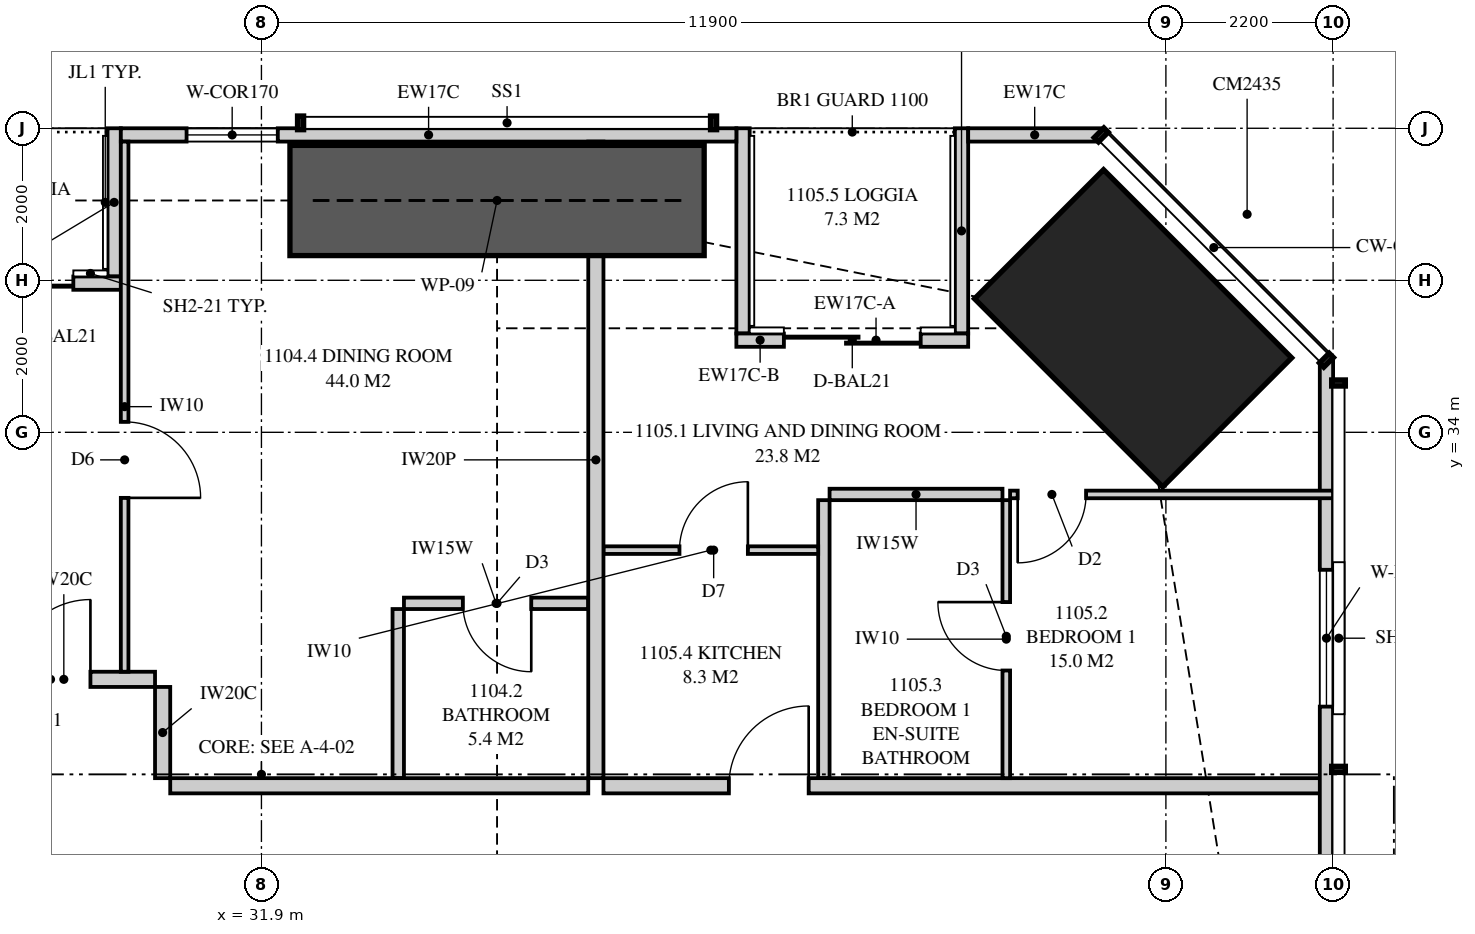
"""IFC4 building model, lengths in metres.
Left out: names, types, materials, properties, quantities, classifications, styles, units other than length and angle.
Written with IfcOpenShell. Run it as: python <this file> out.ifc"""

import sys

from ifc_helpers import new_model, si_unit, direction, frame, frame_2d, origin, origin_2d, place, context, subcontext, project, spatial, polyline, rectangle, outline, extrude, element, fill, save


model = new_model("IFC4")
c1 = context("Model", 3, precision=1e-05, world=origin(), true_north=direction((0.0, 1.0)))
c2 = subcontext(c1, "Body", "Model", "MODEL_VIEW")
j1 = project(units=[si_unit("LENGTHUNIT", "METRE"), si_unit("PLANEANGLEUNIT", "RADIAN")], contexts=[c1])
p1 = place(None, origin())
s1 = spatial("IfcSite", under=j1, at=p1, CompositionType="ELEMENT")
p2 = place(p1, origin())
s2 = spatial("IfcBuilding", under=s1, at=p2, CompositionType="ELEMENT")
p3 = place(p2, frame((0.0, 0.0, 44.45)))
s3 = spatial("IfcBuildingStorey", under=s2, at=p3, CompositionType="ELEMENT", Elevation=44.45)
p4 = place(p3, frame((43.369, 35.369, 0.0), z_axis=(0.0, 0.0, 1.0), x_axis=(-0.707106781187, -0.707106781187, 0.0)))
e1 = element("IfcColumn", 1, at=p4, inside=s3, PredefinedType="COLUMN", context=c2, shape_type="SweptSolid", body=[
    extrude(rectangle(XDim=2.4, YDim=3.5, at=origin_2d()), origin(), (0.0, 0.0, 1.0), 3.35),
])
p5 = place(p3, frame((45.913, 3.051, 0.0), z_axis=(0.0, 0.0, 1.0), x_axis=(0.0, 1.0, 0.0)))
e2 = element("IfcWall", 2, at=p5, inside=s3, PredefinedType="SOLIDWALL", context=c2, shape_type="SweptSolid", body=[
    extrude(outline(polyline([(0.0, 0.0), (31.897, 0.0), (31.897, 3.11), (22.167, 3.11), (22.167, 2.15), (22.074, 2.15), (22.074, 3.11), (21.949, 3.11), (21.949, 2.15), (9.949, 2.15), (9.949, 3.11), (9.823, 3.11), (9.823, 2.15), (9.73, 2.15), (9.73, 3.11), (0.0, 3.11), (0.0, 0.0)])), frame((0.0, 0.087, 0.0), z_axis=(0.0, -1.0, 0.0), x_axis=(1.0, 0.0, 0.0)), (0.0, 0.0, 1.0), 0.175),
])
p6 = place(p5, frame((2.257, 0.0, 0.4)))
e3 = element("IfcOpeningElement", 3, at=p6, cuts=e2, PredefinedType="OPENING", context=c2, shape_type="SweptSolid", body=[
    extrude(rectangle(XDim=1.8, YDim=1.7, at=frame_2d((0.9, 0.85))), frame((0.0, 0.097, 0.0), z_axis=(0.0, -1.0, 0.0), x_axis=(1.0, 0.0, 0.0)), (0.0, 0.0, 1.0), 0.195),
])
p7 = place(p5, frame((14.849, 0.0, 0.4)))
e4 = element("IfcOpeningElement", 4, at=p7, cuts=e2, PredefinedType="OPENING", context=c2, shape_type="SweptSolid", body=[
    extrude(rectangle(XDim=1.2, YDim=1.7, at=frame_2d((0.6, 0.85))), frame((0.0, 0.097, 0.0), z_axis=(0.0, -1.0, 0.0), x_axis=(1.0, 0.0, 0.0)), (0.0, 0.0, 1.0), 0.195),
])
p8 = place(p5, frame((27.34, 0.0, 0.4)))
e5 = element("IfcOpeningElement", 5, at=p8, cuts=e2, PredefinedType="OPENING", context=c2, shape_type="SweptSolid", body=[
    extrude(rectangle(XDim=1.8, YDim=1.7, at=frame_2d((0.9, 0.85))), frame((0.0, 0.097, 0.0), z_axis=(0.0, -1.0, 0.0), x_axis=(1.0, 0.0, 0.0)), (0.0, 0.0, 1.0), 0.195),
])
p9 = place(p3, frame((42.949, 37.913, 0.0), z_axis=(0.0, 0.0, 1.0), x_axis=(-1.0, 0.0, 0.0)))
e6 = element("IfcWall", 6, at=p9, inside=s3, PredefinedType="SOLIDWALL", context=c2, shape_type="SweptSolid", body=[
    extrude(rectangle(XDim=1.75, YDim=0.175, at=frame_2d((0.875, 0.0))), origin(), (0.0, 0.0, 1.0), 3.11),
])
p10 = place(p3, frame((38.149, 37.913, 0.0), z_axis=(0.0, 0.0, 1.0), x_axis=(-1.0, 0.0, 0.0)))
e7 = element("IfcWall", 7, at=p10, inside=s3, PredefinedType="SOLIDWALL", context=c2, shape_type="SweptSolid", body=[
    extrude(outline(polyline([(0.0, 0.0), (8.099, 0.0), (8.099, 2.15), (3.149, 2.15), (3.149, 3.11), (2.993, 3.11), (2.993, 2.15), (2.945, 2.15), (2.945, 3.11), (0.0, 3.11), (0.0, 0.0)])), frame((0.0, 0.087, 0.0), z_axis=(0.0, -1.0, 0.0), x_axis=(1.0, 0.0, 0.0)), (0.0, 0.0, 1.0), 0.175),
])
p11 = place(p10, frame((6.034, 0.0, 0.4)))
e8 = element("IfcOpeningElement", 8, at=p11, cuts=e7, PredefinedType="OPENING", context=c2, shape_type="SweptSolid", body=[
    extrude(rectangle(XDim=1.2, YDim=1.7, at=frame_2d((0.6, 0.85))), frame((0.0, 0.097, 0.0), z_axis=(0.0, -1.0, 0.0), x_axis=(1.0, 0.0, 0.0)), (0.0, 0.0, 1.0), 0.195),
])
p12 = place(p3, frame((41.199, 35.212, 0.0), z_axis=(0.0, 0.0, 1.0), x_axis=(-1.0, 0.0, 0.0)))
e9 = element("IfcWall", 9, at=p12, inside=s3, PredefinedType="SOLIDWALL", context=c2, shape_type="SweptSolid", body=[
    extrude(rectangle(XDim=2.425, YDim=0.175, at=frame_2d((1.212, 0.0))), origin(), (0.0, 0.0, 1.0), 2.15),
])
p13 = place(p12, frame((0.625, 0.0, 0.0)))
e10 = element("IfcOpeningElement", 10, at=p13, cuts=e9, PredefinedType="OPENING", context=c2, shape_type="SweptSolid", body=[
    extrude(rectangle(XDim=1.8, YDim=2.1, at=frame_2d((0.9, 1.05))), frame((0.0, 0.097, 0.0), z_axis=(0.0, -1.0, 0.0), x_axis=(1.0, 0.0, 0.0)), (0.0, 0.0, 1.0), 0.195),
])
p14 = place(p3, frame((38.774, 35.212, 0.0), z_axis=(0.0, 0.0, 1.0), x_axis=(-1.0, 0.0, 0.0)))
e11 = element("IfcWall", 11, at=p14, inside=s3, PredefinedType="SOLIDWALL", context=c2, shape_type="SweptSolid", body=[
    extrude(rectangle(XDim=0.625, YDim=0.175, at=frame_2d((0.312, 0.0))), origin(), (0.0, 0.0, 1.0), 2.51),
])
p15 = place(p3, frame((41.111, 38.0, 0.0), z_axis=(0.0, 0.0, 1.0), x_axis=(0.0, -1.0, 0.0)))
e12 = element("IfcWall", 12, at=p15, inside=s3, PredefinedType="SOLIDWALL", context=c2, shape_type="SweptSolid", body=[
    extrude(outline(polyline([(0.0, 0.0), (2.7, 0.0), (2.7, 2.15), (1.344, 2.15), (1.344, 3.11), (0.0, 3.11), (0.0, 0.0)])), frame((0.0, 0.087, 0.0), z_axis=(0.0, -1.0, 0.0), x_axis=(1.0, 0.0, 0.0)), (0.0, 0.0, 1.0), 0.175),
])
p16 = place(p3, frame((38.236, 38.0, 0.0), z_axis=(0.0, 0.0, 1.0), x_axis=(0.0, -1.0, 0.0)))
e13 = element("IfcWall", 13, at=p16, inside=s3, PredefinedType="SOLIDWALL", context=c2, shape_type="SweptSolid", body=[
    extrude(outline(polyline([(0.0, 0.0), (2.7, 0.0), (2.7, 2.51), (2.434, 2.51), (2.434, 2.15), (0.767, 2.15), (0.767, 3.11), (0.0, 3.11), (0.0, 0.0)])), frame((0.0, 0.087, 0.0), z_axis=(0.0, -1.0, 0.0), x_axis=(1.0, 0.0, 0.0)), (0.0, 0.0, 1.0), 0.175),
])
p17 = place(p3, frame((30.05, 35.962, 0.0), z_axis=(0.0, 0.0, 1.0), x_axis=(-1.0, 0.0, 0.0)))
e14 = element("IfcWall", 14, at=p17, inside=s3, PredefinedType="SOLIDWALL", context=c2, shape_type="SweptSolid", body=[
    extrude(rectangle(XDim=3.05, YDim=0.175, at=frame_2d((1.525, 0.0))), origin(), (0.0, 0.0, 1.0), 3.11),
])
p18 = place(p17, frame((0.625, 0.0, 0.0)))
e15 = element("IfcOpeningElement", 15, at=p18, cuts=e14, PredefinedType="OPENING", context=c2, shape_type="SweptSolid", body=[
    extrude(rectangle(XDim=1.8, YDim=2.1, at=frame_2d((0.9, 1.05))), frame((0.0, 0.097, 0.0), z_axis=(0.0, -1.0, 0.0), x_axis=(1.0, 0.0, 0.0)), (0.0, 0.0, 1.0), 0.195),
])
p19 = place(p3, frame((29.962, 38.0, 0.0), z_axis=(0.0, 0.0, 1.0), x_axis=(0.0, -1.0, 0.0)))
e16 = element("IfcWall", 16, at=p19, inside=s3, PredefinedType="SOLIDWALL", context=c2, shape_type="SweptSolid", body=[
    extrude(outline(polyline([(0.0, 0.0), (1.95, 0.0), (1.95, 3.11), (1.75, 3.11), (1.75, 2.15), (0.15, 2.15), (0.15, 3.11), (0.0, 3.11), (0.0, 0.0)])), frame((0.0, 0.087, 0.0), z_axis=(0.0, -1.0, 0.0), x_axis=(1.0, 0.0, 0.0)), (0.0, 0.0, 1.0), 0.175),
])
p20 = place(p3, frame((36.3, 37.825, 0.0), z_axis=(0.0, 0.0, 1.0), x_axis=(0.0, -1.0, 0.0)))
e17 = element("IfcWall", 17, at=p20, inside=s3, PredefinedType="PARTITIONING", context=c2, shape_type="SweptSolid", body=[
    extrude(outline(polyline([(0.108, 3.11), (0.0, 3.11), (0.0, 0.0), (0.529, 0.0), (0.529, 0.608), (1.021, 0.608), (1.021, 0.0), (8.375, 0.0), (8.375, 3.11), (3.766, 3.11), (3.766, 2.51), (1.964, 2.51), (1.964, 2.15), (1.021, 2.15), (1.021, 1.542), (0.529, 1.542), (0.529, 2.15), (0.108, 2.15), (0.108, 3.11)])), frame((0.0, 0.1, 0.0), z_axis=(0.0, -1.0, 0.0), x_axis=(1.0, 0.0, 0.0)), (0.0, 0.0, 1.0), 0.2),
])
p21 = place(p3, frame((33.775, 31.75, 0.0), z_axis=(0.0, 0.0, 1.0), x_axis=(1.0, 0.0, 0.0)))
e18 = element("IfcWall", 18, at=p21, inside=s3, PredefinedType="PLUMBINGWALL", context=c2, shape_type="SweptSolid", body=[
    extrude(outline(polyline([(0.0, 0.0), (2.425, 0.0), (2.425, 3.11), (1.537, 3.11), (1.537, 2.541), (0.913, 2.541), (0.913, 3.11), (0.0, 3.11), (0.0, 0.0)])), frame((0.0, 0.075, 0.0), z_axis=(0.0, -1.0, 0.0), x_axis=(1.0, 0.0, 0.0)), (0.0, 0.0, 1.0), 0.15),
])
p22 = place(p21, frame((0.775, 0.0, 0.0)))
e19 = element("IfcOpeningElement", 19, at=p22, cuts=e18, PredefinedType="OPENING", context=c2, shape_type="SweptSolid", body=[
    extrude(rectangle(XDim=0.9, YDim=2.1, at=frame_2d((0.45, 1.05))), frame((0.0, 0.085, 0.0), z_axis=(0.0, -1.0, 0.0), x_axis=(1.0, 0.0, 0.0)), (0.0, 0.0, 1.0), 0.17),
])
p23 = place(p3, frame((33.7, 31.675, 0.0), z_axis=(0.0, 0.0, 1.0), x_axis=(0.0, -1.0, 0.0)))
e20 = element("IfcWall", 20, at=p23, inside=s3, PredefinedType="PLUMBINGWALL", context=c2, shape_type="SweptSolid", body=[
    extrude(rectangle(XDim=2.225, YDim=0.15, at=frame_2d((1.113, 0.0))), origin(), (0.0, 0.0, 1.0), 3.11),
])
p24 = place(p3, frame((30.1, 37.825, 0.0), z_axis=(0.0, 0.0, 1.0), x_axis=(0.0, -1.0, 0.0)))
e21 = element("IfcWall", 21, at=p24, inside=s3, PredefinedType="PARTITIONING", context=c2, shape_type="SweptSolid", body=[
    extrude(outline(polyline([(0.0, 0.0), (6.975, 0.0), (6.975, 3.11), (1.635, 3.11), (1.635, 2.15), (0.0, 2.15), (0.0, 3.11), (0.0, 0.0)])), frame((0.0, 0.05, 0.0), z_axis=(0.0, -1.0, 0.0), x_axis=(1.0, 0.0, 0.0)), (0.0, 0.0, 1.0), 0.1),
])
p25 = place(p24, frame((3.688, 0.0, 0.0)))
e22 = element("IfcOpeningElement", 22, at=p25, cuts=e21, PredefinedType="OPENING", context=c2, shape_type="SweptSolid", body=[
    extrude(rectangle(XDim=1.0, YDim=2.1, at=frame_2d((0.5, 1.05))), frame((0.0, 0.06, 0.0), z_axis=(0.0, -1.0, 0.0), x_axis=(1.0, 0.0, 0.0)), (0.0, 0.0, 1.0), 0.12),
])
p26 = place(p3, frame((36.4, 29.35, 0.0), z_axis=(0.0, 0.0, 1.0), x_axis=(1.0, 0.0, 0.0)))
e23 = element("IfcWall", 23, at=p26, inside=s3, PredefinedType="PARTITIONING", context=c2, shape_type="SweptSolid", body=[
    extrude(outline(polyline([(0.0, 0.0), (9.6, 0.0), (9.6, 3.11), (8.866, 3.11), (8.866, 2.15), (7.023, 2.15), (7.023, 3.11), (0.0, 3.11), (0.0, 0.0)])), frame((0.0, 0.1, 0.0), z_axis=(0.0, -1.0, 0.0), x_axis=(1.0, 0.0, 0.0)), (0.0, 0.0, 1.0), 0.2),
])
p27 = place(p26, frame((1.65, 0.0, 0.0)))
e24 = element("IfcOpeningElement", 24, at=p27, cuts=e23, PredefinedType="OPENING", context=c2, shape_type="SweptSolid", body=[
    extrude(rectangle(XDim=1.05, YDim=2.2, at=frame_2d((0.525, 1.1))), frame((0.0, 0.11, 0.0), z_axis=(0.0, -1.0, 0.0), x_axis=(1.0, 0.0, 0.0)), (0.0, 0.0, 1.0), 0.22),
])
p28 = place(p3, frame((41.7, 33.108, 0.0), z_axis=(0.0, 0.0, 1.0), x_axis=(0.0, -1.0, 0.0)))
e25 = element("IfcWall", 25, at=p28, inside=s3, PredefinedType="PARTITIONING", context=c2, shape_type="SweptSolid", body=[
    extrude(rectangle(XDim=3.658, YDim=0.1, at=frame_2d((1.829, 0.0))), origin(), (0.0, 0.0, 1.0), 3.11),
])
p29 = place(p28, frame((1.341, 0.0, 0.0)))
e26 = element("IfcOpeningElement", 26, at=p29, cuts=e25, PredefinedType="OPENING", context=c2, shape_type="SweptSolid", body=[
    extrude(rectangle(XDim=0.9, YDim=2.1, at=frame_2d((0.45, 1.05))), frame((0.0, 0.06, 0.0), z_axis=(0.0, -1.0, 0.0), x_axis=(1.0, 0.0, 0.0)), (0.0, 0.0, 1.0), 0.12),
])
p30 = place(p3, frame((41.75, 33.183, 0.0), z_axis=(0.0, 0.0, 1.0), x_axis=(1.0, 0.0, 0.0)))
e27 = element("IfcWall", 27, at=p30, inside=s3, PredefinedType="PARTITIONING", context=c2, shape_type="SweptSolid", body=[
    extrude(outline(polyline([(0.0, 0.0), (4.25, 0.0), (4.25, 3.11), (2.844, 3.11), (2.844, 2.15), (1.102, 2.15), (1.102, 3.11), (0.0, 3.11), (0.0, 0.0)])), frame((0.0, 0.05, 0.0), z_axis=(0.0, -1.0, 0.0), x_axis=(1.0, 0.0, 0.0)), (0.0, 0.0, 1.0), 0.1),
])
p31 = place(p30, frame((0.1, 0.0, 0.0)))
e28 = element("IfcOpeningElement", 28, at=p31, cuts=e27, PredefinedType="OPENING", context=c2, shape_type="SweptSolid", body=[
    extrude(rectangle(XDim=0.9, YDim=2.1, at=frame_2d((0.45, 1.05))), frame((0.0, 0.06, 0.0), z_axis=(0.0, -1.0, 0.0), x_axis=(1.0, 0.0, 0.0)), (0.0, 0.0, 1.0), 0.12),
])
p32 = place(p3, frame((39.375, 33.183, 0.0), z_axis=(0.0, 0.0, 1.0), x_axis=(1.0, 0.0, 0.0)))
e29 = element("IfcWall", 29, at=p32, inside=s3, PredefinedType="PLUMBINGWALL", context=c2, shape_type="SweptSolid", body=[
    extrude(rectangle(XDim=2.275, YDim=0.15, at=frame_2d((1.137, 0.0))), origin(), (0.0, 0.0, 1.0), 3.11),
])
p33 = place(p3, frame((39.3, 33.108, 0.0), z_axis=(0.0, 0.0, 1.0), x_axis=(0.0, -1.0, 0.0)))
e30 = element("IfcWall", 30, at=p33, inside=s3, PredefinedType="PLUMBINGWALL", context=c2, shape_type="SweptSolid", body=[
    extrude(rectangle(XDim=3.658, YDim=0.15, at=frame_2d((1.829, 0.0))), origin(), (0.0, 0.0, 1.0), 3.11),
])
p34 = place(p3, frame((36.4, 32.45, 0.0), z_axis=(0.0, 0.0, 1.0), x_axis=(1.0, 0.0, 0.0)))
e31 = element("IfcWall", 31, at=p34, inside=s3, PredefinedType="PARTITIONING", context=c2, shape_type="SweptSolid", body=[
    extrude(rectangle(XDim=2.825, YDim=0.1, at=frame_2d((1.413, 0.0))), origin(), (0.0, 0.0, 1.0), 3.11),
])
p35 = place(p34, frame((1.0, 0.0, 0.0)))
e32 = element("IfcOpeningElement", 32, at=p35, cuts=e31, PredefinedType="OPENING", context=c2, shape_type="SweptSolid", body=[
    extrude(rectangle(XDim=0.9, YDim=2.1, at=frame_2d((0.45, 1.05))), frame((0.0, 0.06, 0.0), z_axis=(0.0, -1.0, 0.0), x_axis=(1.0, 0.0, 0.0)), (0.0, 0.0, 1.0), 0.12),
])
p36 = place(p3, frame((30.7, 29.35, 0.0), z_axis=(0.0, 0.0, 1.0), x_axis=(1.0, 0.0, 0.0)))
e33 = element("IfcWall", 33, at=p36, inside=s3, PredefinedType="PARTITIONING", context=c2, shape_type="SweptSolid", body=[
    extrude(outline(polyline([(0.0, 0.0), (5.5, 0.0), (5.5, 3.11), (4.637, 3.11), (4.637, 2.541), (3.963, 2.541), (3.963, 3.11), (0.0, 3.11), (0.0, 0.0)])), frame((0.0, 0.1, 0.0), z_axis=(0.0, -1.0, 0.0), x_axis=(1.0, 0.0, 0.0)), (0.0, 0.0, 1.0), 0.2),
])
p37 = place(p3, frame((28.1, 30.75, 0.0), z_axis=(0.0, 0.0, 1.0), x_axis=(1.0, 0.0, 0.0)))
e34 = element("IfcWall", 34, at=p37, inside=s3, PredefinedType="PARTITIONING", context=c2, shape_type="SweptSolid", body=[
    extrude(rectangle(XDim=2.4, YDim=0.2, at=frame_2d((1.2, 0.0))), origin(), (0.0, 0.0, 1.0), 3.11),
])
p38 = place(p37, frame((0.5, 0.0, 0.0)))
e35 = element("IfcOpeningElement", 35, at=p38, cuts=e34, PredefinedType="OPENING", context=c2, shape_type="SweptSolid", body=[
    extrude(rectangle(XDim=1.05, YDim=2.2, at=frame_2d((0.525, 1.1))), frame((0.0, 0.11, 0.0), z_axis=(0.0, -1.0, 0.0), x_axis=(1.0, 0.0, 0.0)), (0.0, 0.0, 1.0), 0.22),
])
p39 = place(p3, frame((30.6, 29.45, 0.0), z_axis=(0.0, 0.0, 1.0), x_axis=(0.0, 1.0, 0.0)))
e36 = element("IfcWall", 36, at=p39, inside=s3, PredefinedType="PARTITIONING", context=c2, shape_type="SweptSolid", body=[
    extrude(rectangle(XDim=1.2, YDim=0.2, at=frame_2d((0.6, 0.0))), origin(), (0.0, 0.0, 1.0), 3.11),
])
p40 = place(p3, frame((32.275, 37.05, 0.0), z_axis=(0.0, 0.0, 1.0), x_axis=(1.0, 0.0, 0.0)))
e37 = element("IfcWall", 37, at=p40, inside=s3, PredefinedType="SHEAR", context=c2, shape_type="SweptSolid", body=[
    extrude(rectangle(XDim=5.45, YDim=1.45, at=frame_2d((2.725, 0.0))), origin(), (0.0, 0.0, 1.0), 3.35),
])
p41 = place(p8, origin())
e38 = element("IfcWindow", 38, at=p41, inside=s3, PartitioningType="SINGLE_PANEL", PredefinedType="WINDOW", context=c2, shape_type="SweptSolid", body=[
    extrude(rectangle(XDim=1.8, YDim=1.7, at=frame_2d((0.9, 0.85))), frame((0.0, 0.03, 0.0), z_axis=(0.0, -1.0, 0.0), x_axis=(1.0, 0.0, 0.0)), (0.0, 0.0, 1.0), 0.06),
])
fill(e5, e38)
p42 = place(p13, origin())
e39 = element("IfcDoor", 39, at=p42, inside=s3, OperationType="SLIDING_TO_LEFT", PredefinedType="DOOR", context=c2, shape_type="SweptSolid", body=[
    extrude(rectangle(XDim=1.8, YDim=2.1, at=frame_2d((0.9, 1.05))), frame((0.0, 0.025, 0.0), z_axis=(0.0, -1.0, 0.0), x_axis=(1.0, 0.0, 0.0)), (0.0, 0.0, 1.0), 0.05),
])
fill(e10, e39)
p43 = place(p11, origin())
e40 = element("IfcWindow", 40, at=p43, inside=s3, PartitioningType="SINGLE_PANEL", PredefinedType="WINDOW", context=c2, shape_type="SweptSolid", body=[
    extrude(rectangle(XDim=1.2, YDim=1.7, at=frame_2d((0.6, 0.85))), frame((0.0, 0.03, 0.0), z_axis=(0.0, -1.0, 0.0), x_axis=(1.0, 0.0, 0.0)), (0.0, 0.0, 1.0), 0.06),
])
fill(e8, e40)
p44 = place(p18, origin())
e41 = element("IfcDoor", 41, at=p44, inside=s3, OperationType="SLIDING_TO_LEFT", PredefinedType="DOOR", context=c2, shape_type="SweptSolid", body=[
    extrude(rectangle(XDim=1.8, YDim=2.1, at=frame_2d((0.9, 1.05))), frame((0.0, 0.025, 0.0), z_axis=(0.0, -1.0, 0.0), x_axis=(1.0, 0.0, 0.0)), (0.0, 0.0, 1.0), 0.05),
])
fill(e15, e41)
p45 = place(p38, origin())
e42 = element("IfcDoor", 42, at=p45, inside=s3, OperationType="SINGLE_SWING_RIGHT", PredefinedType="DOOR", context=c2, shape_type="SweptSolid", body=[
    extrude(rectangle(XDim=1.05, YDim=2.2, at=frame_2d((0.525, 1.1))), frame((0.0, 0.025, 0.0), z_axis=(0.0, -1.0, 0.0), x_axis=(1.0, 0.0, 0.0)), (0.0, 0.0, 1.0), 0.05),
])
fill(e35, e42)
p46 = place(p22, frame((0.9, 0.0, 0.0), z_axis=(0.0, 0.0, 1.0), x_axis=(-1.0, 0.0, 0.0)))
e43 = element("IfcDoor", 43, at=p46, inside=s3, OperationType="SINGLE_SWING_LEFT", PredefinedType="DOOR", context=c2, shape_type="SweptSolid", body=[
    extrude(rectangle(XDim=0.9, YDim=2.1, at=frame_2d((0.45, 1.05))), frame((0.0, 0.025, 0.0), z_axis=(0.0, -1.0, 0.0), x_axis=(1.0, 0.0, 0.0)), (0.0, 0.0, 1.0), 0.05),
])
fill(e19, e43)
p47 = place(p25, origin())
e44 = element("IfcDoor", 44, at=p47, inside=s3, OperationType="SINGLE_SWING_RIGHT", PredefinedType="DOOR", context=c2, shape_type="SweptSolid", body=[
    extrude(rectangle(XDim=1.0, YDim=2.1, at=frame_2d((0.5, 1.05))), frame((0.0, 0.025, 0.0), z_axis=(0.0, -1.0, 0.0), x_axis=(1.0, 0.0, 0.0)), (0.0, 0.0, 1.0), 0.05),
])
fill(e22, e44)
p48 = place(p27, origin())
e45 = element("IfcDoor", 45, at=p48, inside=s3, OperationType="SINGLE_SWING_RIGHT", PredefinedType="DOOR", context=c2, shape_type="SweptSolid", body=[
    extrude(rectangle(XDim=1.05, YDim=2.2, at=frame_2d((0.525, 1.1))), frame((0.0, 0.025, 0.0), z_axis=(0.0, -1.0, 0.0), x_axis=(1.0, 0.0, 0.0)), (0.0, 0.0, 1.0), 0.05),
])
fill(e24, e45)
p49 = place(p31, frame((0.9, 0.0, 0.0), z_axis=(0.0, 0.0, 1.0), x_axis=(-1.0, 0.0, 0.0)))
e46 = element("IfcDoor", 46, at=p49, inside=s3, OperationType="SINGLE_SWING_RIGHT", PredefinedType="DOOR", context=c2, shape_type="SweptSolid", body=[
    extrude(rectangle(XDim=0.9, YDim=2.1, at=frame_2d((0.45, 1.05))), frame((0.0, 0.025, 0.0), z_axis=(0.0, -1.0, 0.0), x_axis=(1.0, 0.0, 0.0)), (0.0, 0.0, 1.0), 0.05),
])
fill(e28, e46)
p50 = place(p29, frame((0.9, 0.0, 0.0), z_axis=(0.0, 0.0, 1.0), x_axis=(-1.0, 0.0, 0.0)))
e47 = element("IfcDoor", 47, at=p50, inside=s3, OperationType="SINGLE_SWING_RIGHT", PredefinedType="DOOR", context=c2, shape_type="SweptSolid", body=[
    extrude(rectangle(XDim=0.9, YDim=2.1, at=frame_2d((0.45, 1.05))), frame((0.0, 0.025, 0.0), z_axis=(0.0, -1.0, 0.0), x_axis=(1.0, 0.0, 0.0)), (0.0, 0.0, 1.0), 0.05),
])
fill(e26, e47)
p51 = place(p35, origin())
e48 = element("IfcDoor", 48, at=p51, inside=s3, OperationType="SINGLE_SWING_RIGHT", PredefinedType="DOOR", context=c2, shape_type="SweptSolid", body=[
    extrude(rectangle(XDim=0.9, YDim=2.1, at=frame_2d((0.45, 1.05))), frame((0.0, 0.025, 0.0), z_axis=(0.0, -1.0, 0.0), x_axis=(1.0, 0.0, 0.0)), (0.0, 0.0, 1.0), 0.05),
])
fill(e32, e48)
save(model, sys.argv[1])
